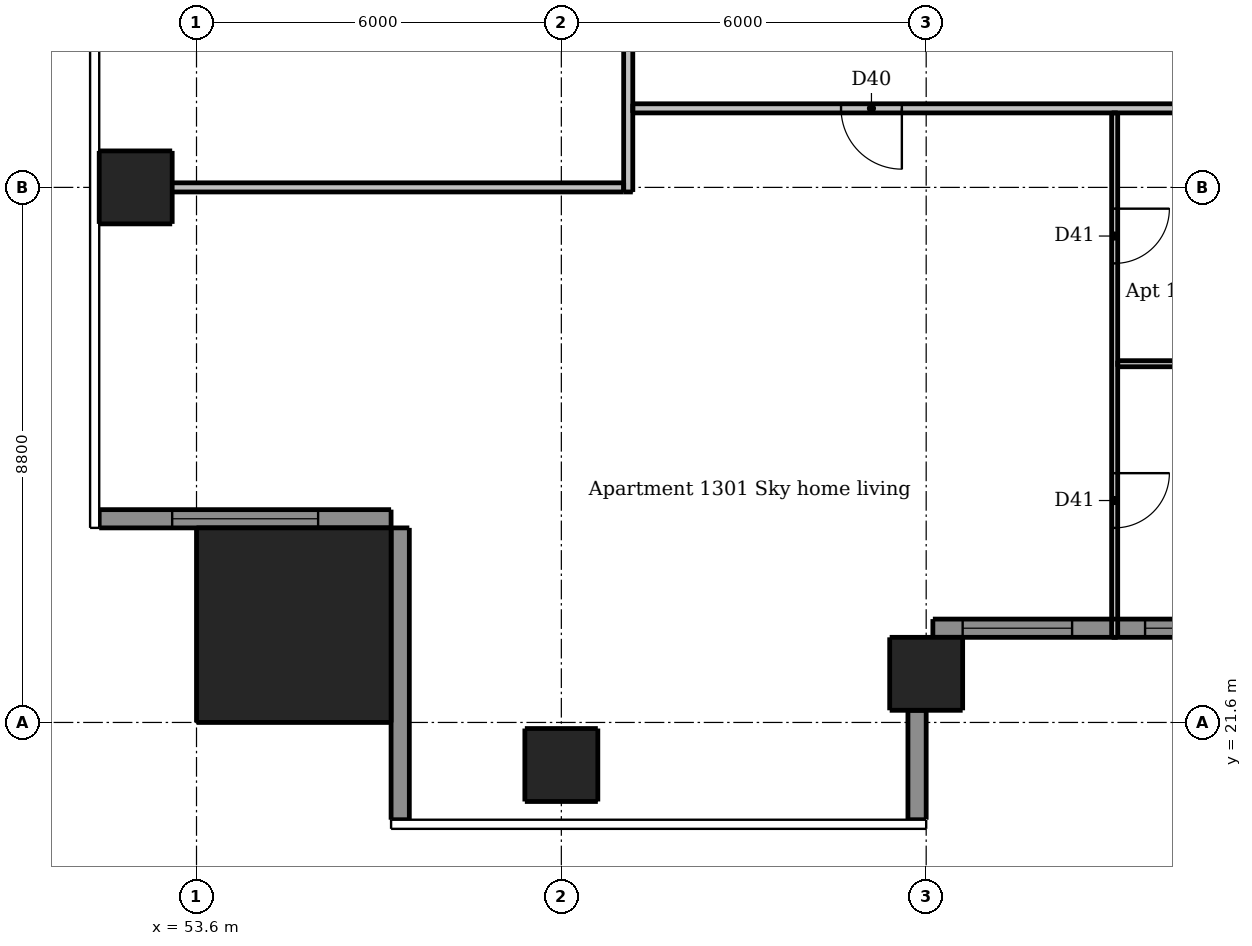
"""IFC4 building model, lengths in metres.
Left out: names, types, materials, properties, quantities, classifications, styles, units other than length and angle.
Written with IfcOpenShell. Run it as: python <this file> out.ifc"""

import sys

from ifc_helpers import new_model, si_unit, direction, frame, frame_2d, origin, origin_2d, place, context, subcontext, project, spatial, rectangle, extrude, element, fill, save


model = new_model("IFC4")
c1 = context("Model", 3, precision=1e-05, world=origin(), true_north=direction((0.0, 1.0)))
c2 = subcontext(c1, "Body", "Model", "MODEL_VIEW")
j1 = project(units=[si_unit("LENGTHUNIT", "METRE"), si_unit("PLANEANGLEUNIT", "RADIAN")], contexts=[c1])
p1 = place(None, origin())
s1 = spatial("IfcSite", under=j1, at=p1, CompositionType="ELEMENT")
p2 = place(p1, origin())
s2 = spatial("IfcBuilding", under=s1, at=p2, CompositionType="ELEMENT")
p3 = place(p2, frame((0.0, 0.0, 49.9)))
s3 = spatial("IfcBuildingStorey", under=s2, at=p3, CompositionType="ELEMENT", Elevation=49.9)
for number, where, z_axis, x_axis in (
    (1, (59.6, 20.9, 0.0), (0.0, 0.0, 1.0), (1.0, 0.0, 0.0)),
    (2, (65.6, 22.4, 0.0), (0.0, 0.0, 1.0), (1.0, 0.0, 0.0)),
    (3, (52.6, 30.4, 0.0), (0.0, 0.0, 1.0), (1.0, 0.0, 0.0)),
):
    element("IfcColumn", number, at=place(p3, frame(where, z_axis=z_axis, x_axis=x_axis)), inside=s3, PredefinedType="COLUMN", context=c2, shape_type="SweptSolid", body=[
        extrude(rectangle(XDim=1.2, YDim=1.2, at=origin_2d()), origin(), (0.0, 0.0, 1.0), 3.05),
    ])
p4 = place(p3, frame((55.2, 23.2, 0.0), z_axis=(0.0, 0.0, 1.0), x_axis=(1.0, 0.0, 0.0)))
e4 = element("IfcColumn", 4, at=p4, inside=s3, PredefinedType="COLUMN", context=c2, shape_type="SweptSolid", body=[
    extrude(rectangle(XDim=3.2, YDim=3.2, at=origin_2d()), origin(), (0.0, 0.0, 1.0), 3.3),
])
p5 = place(p3, frame((65.45, 20.0, 0.0), z_axis=(0.0, 0.0, 1.0), x_axis=(0.0, 1.0, 0.0)))
e5 = element("IfcWall", 5, at=p5, inside=s3, PredefinedType="SOLIDWALL", context=c2, shape_type="SweptSolid", body=[
    extrude(rectangle(XDim=1.8, YDim=0.3, at=frame_2d((0.9, 0.0))), origin(), (0.0, 0.0, 1.0), 3.05),
])
p6 = place(p3, frame((52.0, 24.95, 0.0), z_axis=(0.0, 0.0, 1.0), x_axis=(1.0, 0.0, 0.0)))
e6 = element("IfcWall", 6, at=p6, inside=s3, PredefinedType="SOLIDWALL", context=c2, shape_type="SweptSolid", body=[
    extrude(rectangle(XDim=4.8, YDim=0.3, at=frame_2d((2.4, 0.0))), origin(), (0.0, 0.0, 1.0), 3.05),
])
p7 = place(p6, frame((1.2, 0.0, 0.15)))
e7 = element("IfcOpeningElement", 7, at=p7, cuts=e6, PredefinedType="OPENING", context=c2, shape_type="SweptSolid", body=[
    extrude(rectangle(XDim=2.4, YDim=2.1, at=frame_2d((1.2, 1.05))), frame((0.0, 0.16, 0.0), z_axis=(0.0, -1.0, 0.0), x_axis=(1.0, 0.0, 0.0)), (0.0, 0.0, 1.0), 0.32),
])
p8 = place(p3, frame((56.95, 24.8, 0.0), z_axis=(0.0, 0.0, 1.0), x_axis=(0.0, -1.0, 0.0)))
e8 = element("IfcWall", 8, at=p8, inside=s3, PredefinedType="SOLIDWALL", context=c2, shape_type="SweptSolid", body=[
    extrude(rectangle(XDim=4.8, YDim=0.3, at=frame_2d((2.4, 0.0))), origin(), (0.0, 0.0, 1.0), 3.05),
])
p9 = place(p3, frame((65.71, 23.15, 0.0), z_axis=(0.0, 0.0, 1.0), x_axis=(1.0, 0.0, 0.0)))
e9 = element("IfcWall", 9, at=p9, inside=s3, PredefinedType="SOLIDWALL", context=c2, shape_type="SweptSolid", body=[
    extrude(rectangle(XDim=5.78, YDim=0.3, at=frame_2d((2.89, 0.0))), origin(), (0.0, 0.0, 1.0), 3.05),
])
p10 = place(p9, frame((0.49, 0.0, 0.15)))
e10 = element("IfcOpeningElement", 10, at=p10, cuts=e9, PredefinedType="OPENING", context=c2, shape_type="SweptSolid", body=[
    extrude(rectangle(XDim=1.8, YDim=2.1, at=frame_2d((0.9, 1.05))), frame((0.0, 0.16, 0.0), z_axis=(0.0, -1.0, 0.0), x_axis=(1.0, 0.0, 0.0)), (0.0, 0.0, 1.0), 0.32),
])
p11 = place(p9, frame((3.49, 0.0, 0.15)))
e11 = element("IfcOpeningElement", 11, at=p11, cuts=e9, PredefinedType="OPENING", context=c2, shape_type="SweptSolid", body=[
    extrude(rectangle(XDim=1.8, YDim=2.1, at=frame_2d((0.9, 1.05))), frame((0.0, 0.16, 0.0), z_axis=(0.0, -1.0, 0.0), x_axis=(1.0, 0.0, 0.0)), (0.0, 0.0, 1.0), 0.32),
])
p12 = place(p3, frame((68.7, 31.625, 0.0), z_axis=(0.0, 0.0, 1.0), x_axis=(0.0, -1.0, 0.0)))
e12 = element("IfcWall", 12, at=p12, inside=s3, PredefinedType="PARTITIONING", context=c2, shape_type="SweptSolid", body=[
    extrude(rectangle(XDim=8.625, YDim=0.1, at=frame_2d((4.312, 0.0))), origin(), (0.0, 0.0, 1.0), 3.05),
])
p13 = place(p12, frame((1.575, 0.0, 0.0)))
e13 = element("IfcOpeningElement", 13, at=p13, cuts=e12, PredefinedType="OPENING", context=c2, shape_type="SweptSolid", body=[
    extrude(rectangle(XDim=0.9, YDim=2.1, at=frame_2d((0.45, 1.05))), frame((0.0, 0.06, 0.0), z_axis=(0.0, -1.0, 0.0), x_axis=(1.0, 0.0, 0.0)), (0.0, 0.0, 1.0), 0.12),
])
p14 = place(p12, frame((5.925, 0.0, 0.0)))
e14 = element("IfcOpeningElement", 14, at=p14, cuts=e12, PredefinedType="OPENING", context=c2, shape_type="SweptSolid", body=[
    extrude(rectangle(XDim=0.9, YDim=2.1, at=frame_2d((0.45, 1.05))), frame((0.0, 0.06, 0.0), z_axis=(0.0, -1.0, 0.0), x_axis=(1.0, 0.0, 0.0)), (0.0, 0.0, 1.0), 0.12),
])
p15 = place(p3, frame((68.75, 27.5, 0.0), z_axis=(0.0, 0.0, 1.0), x_axis=(1.0, 0.0, 0.0)))
e15 = element("IfcWall", 15, at=p15, inside=s3, PredefinedType="PARTITIONING", context=c2, shape_type="SweptSolid", body=[
    extrude(rectangle(XDim=5.775, YDim=0.1, at=frame_2d((2.887, 0.0))), origin(), (0.0, 0.0, 1.0), 3.05),
])
p16 = place(p15, frame((3.7, 0.0, 0.0)))
e16 = element("IfcOpeningElement", 16, at=p16, cuts=e15, PredefinedType="OPENING", context=c2, shape_type="SweptSolid", body=[
    extrude(rectangle(XDim=0.8, YDim=2.1, at=frame_2d((0.4, 1.05))), frame((0.0, 0.06, 0.0), z_axis=(0.0, -1.0, 0.0), x_axis=(1.0, 0.0, 0.0)), (0.0, 0.0, 1.0), 0.12),
])
p17 = place(p3, frame((60.7, 30.325, 0.0), z_axis=(0.0, 0.0, 1.0), x_axis=(0.0, 1.0, 0.0)))
e17 = element("IfcWall", 17, at=p17, inside=s3, PredefinedType="PARTITIONING", context=c2, shape_type="SweptSolid", body=[
    extrude(rectangle(XDim=28.9, YDim=0.15, at=frame_2d((14.45, 0.0))), origin(), (0.0, 0.0, 1.0), 3.05),
])
p18 = place(p17, frame((7.375, 0.0, 0.0)))
e18 = element("IfcOpeningElement", 18, at=p18, cuts=e17, PredefinedType="OPENING", context=c2, shape_type="SweptSolid", body=[
    extrude(rectangle(XDim=1.0, YDim=2.1, at=frame_2d((0.5, 1.05))), frame((0.0, 0.085, 0.0), z_axis=(0.0, -1.0, 0.0), x_axis=(1.0, 0.0, 0.0)), (0.0, 0.0, 1.0), 0.17),
])
p19 = place(p17, frame((26.025, 0.0, 0.0)))
e19 = element("IfcOpeningElement", 19, at=p19, cuts=e17, PredefinedType="OPENING", context=c2, shape_type="SweptSolid", body=[
    extrude(rectangle(XDim=1.0, YDim=2.1, at=frame_2d((0.5, 1.05))), frame((0.0, 0.085, 0.0), z_axis=(0.0, -1.0, 0.0), x_axis=(1.0, 0.0, 0.0)), (0.0, 0.0, 1.0), 0.17),
])
p20 = place(p3, frame((89.525, 31.7, 0.0), z_axis=(0.0, 0.0, 1.0), x_axis=(-1.0, 0.0, 0.0)))
e20 = element("IfcWall", 20, at=p20, inside=s3, PredefinedType="PARTITIONING", context=c2, shape_type="SweptSolid", body=[
    extrude(rectangle(XDim=28.75, YDim=0.15, at=frame_2d((14.375, 0.0))), origin(), (0.0, 0.0, 1.0), 3.05),
])
p21 = place(p20, frame((24.325, 0.0, 0.0)))
e21 = element("IfcOpeningElement", 21, at=p21, cuts=e20, PredefinedType="OPENING", context=c2, shape_type="SweptSolid", body=[
    extrude(rectangle(XDim=1.0, YDim=2.1, at=frame_2d((0.5, 1.05))), frame((0.0, 0.085, 0.0), z_axis=(0.0, -1.0, 0.0), x_axis=(1.0, 0.0, 0.0)), (0.0, 0.0, 1.0), 0.17),
])
p22 = place(p20, frame((6.575, 0.0, 0.0)))
e22 = element("IfcOpeningElement", 22, at=p22, cuts=e20, PredefinedType="OPENING", context=c2, shape_type="SweptSolid", body=[
    extrude(rectangle(XDim=1.0, YDim=2.1, at=frame_2d((0.5, 1.05))), frame((0.0, 0.085, 0.0), z_axis=(0.0, -1.0, 0.0), x_axis=(1.0, 0.0, 0.0)), (0.0, 0.0, 1.0), 0.17),
])
p23 = place(p3, frame((52.0, 30.4, 0.0), z_axis=(0.0, 0.0, 1.0), x_axis=(1.0, 0.0, 0.0)))
e23 = element("IfcWall", 23, at=p23, inside=s3, PredefinedType="PARTITIONING", context=c2, shape_type="SweptSolid", body=[
    extrude(rectangle(XDim=8.625, YDim=0.15, at=frame_2d((4.312, 0.0))), origin(), (0.0, 0.0, 1.0), 2.647),
])
p24 = place(p7, origin())
e24 = element("IfcWindow", 24, at=p24, inside=s3, PartitioningType="DOUBLE_PANEL_VERTICAL", PredefinedType="WINDOW", context=c2, shape_type="SweptSolid", body=[
    extrude(rectangle(XDim=2.4, YDim=2.1, at=frame_2d((1.2, 1.05))), frame((0.0, 0.03, 0.0), z_axis=(0.0, -1.0, 0.0), x_axis=(1.0, 0.0, 0.0)), (0.0, 0.0, 1.0), 0.06),
])
fill(e7, e24)
p25 = place(p10, origin())
e25 = element("IfcWindow", 25, at=p25, inside=s3, PartitioningType="DOUBLE_PANEL_VERTICAL", PredefinedType="WINDOW", context=c2, shape_type="SweptSolid", body=[
    extrude(rectangle(XDim=1.8, YDim=2.1, at=frame_2d((0.9, 1.05))), frame((0.0, 0.03, 0.0), z_axis=(0.0, -1.0, 0.0), x_axis=(1.0, 0.0, 0.0)), (0.0, 0.0, 1.0), 0.06),
])
fill(e10, e25)
p26 = place(p11, origin())
e26 = element("IfcWindow", 26, at=p26, inside=s3, PartitioningType="DOUBLE_PANEL_VERTICAL", PredefinedType="WINDOW", context=c2, shape_type="SweptSolid", body=[
    extrude(rectangle(XDim=1.8, YDim=2.1, at=frame_2d((0.9, 1.05))), frame((0.0, 0.03, 0.0), z_axis=(0.0, -1.0, 0.0), x_axis=(1.0, 0.0, 0.0)), (0.0, 0.0, 1.0), 0.06),
])
fill(e11, e26)
p27 = place(p21, origin())
e27 = element("IfcDoor", 27, at=p27, inside=s3, OperationType="SINGLE_SWING_LEFT", PredefinedType="DOOR", context=c2, shape_type="SweptSolid", body=[
    extrude(rectangle(XDim=1.0, YDim=2.1, at=frame_2d((0.5, 1.05))), frame((0.0, 0.025, 0.0), z_axis=(0.0, -1.0, 0.0), x_axis=(1.0, 0.0, 0.0)), (0.0, 0.0, 1.0), 0.05),
])
fill(e21, e27)
p28 = place(p13, origin())
e28 = element("IfcDoor", 28, at=p28, inside=s3, OperationType="SINGLE_SWING_LEFT", PredefinedType="DOOR", context=c2, shape_type="SweptSolid", body=[
    extrude(rectangle(XDim=0.9, YDim=2.1, at=frame_2d((0.45, 1.05))), frame((0.0, 0.025, 0.0), z_axis=(0.0, -1.0, 0.0), x_axis=(1.0, 0.0, 0.0)), (0.0, 0.0, 1.0), 0.05),
])
fill(e13, e28)
p29 = place(p14, origin())
e29 = element("IfcDoor", 29, at=p29, inside=s3, OperationType="SINGLE_SWING_LEFT", PredefinedType="DOOR", context=c2, shape_type="SweptSolid", body=[
    extrude(rectangle(XDim=0.9, YDim=2.1, at=frame_2d((0.45, 1.05))), frame((0.0, 0.025, 0.0), z_axis=(0.0, -1.0, 0.0), x_axis=(1.0, 0.0, 0.0)), (0.0, 0.0, 1.0), 0.05),
])
fill(e14, e29)
save(model, sys.argv[1])
